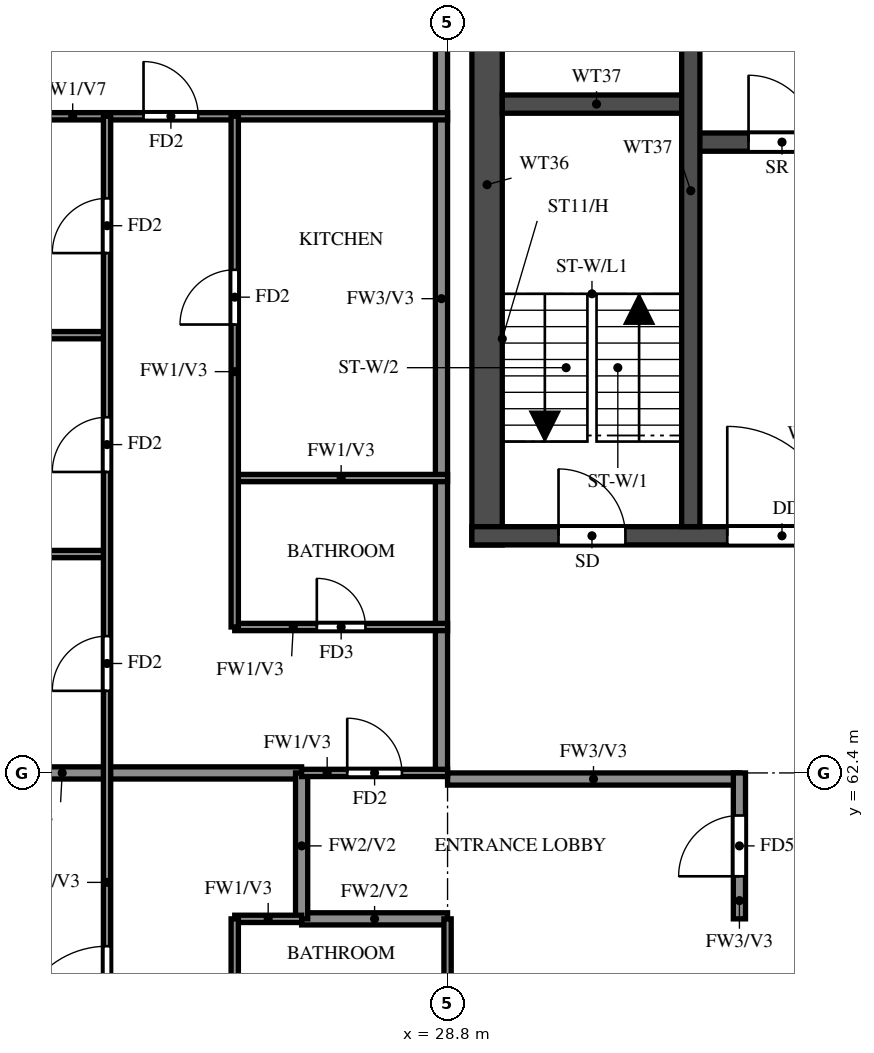
"""IFC4 building model, lengths in metres.
Left out: names, types, materials, properties, quantities, classifications, styles, units other than length and angle.
Written with IfcOpenShell. Run it as: python <this file> out.ifc"""

import sys

from ifc_helpers import new_model, si_unit, direction, frame, frame_2d, origin, place, context, subcontext, project, spatial, rectangle, extrude, element, fill, save


model = new_model("IFC4")
c1 = context("Model", 3, precision=1e-05, world=origin(), true_north=direction((0.0, 1.0)))
c2 = subcontext(c1, "Body", "Model", "MODEL_VIEW")
j1 = project(units=[si_unit("LENGTHUNIT", "METRE"), si_unit("PLANEANGLEUNIT", "RADIAN")], contexts=[c1])
p1 = place(None, origin())
s1 = spatial("IfcSite", under=j1, at=p1, CompositionType="ELEMENT")
p2 = place(p1, origin())
s2 = spatial("IfcBuilding", under=s1, at=p2, CompositionType="ELEMENT")
p3 = place(p2, frame((0.0, 0.0, 222.0)))
s3 = spatial("IfcBuildingStorey", under=s2, at=p3, CompositionType="ELEMENT", Elevation=222.0)
p4 = place(p3, frame((29.45, 66.15, 0.0), z_axis=(0.0, 0.0, 1.0), x_axis=(0.0, 1.0, 0.0)))
e1 = element("IfcWall", 1, at=p4, inside=s3, PredefinedType="SHEAR", context=c2, shape_type="SweptSolid", body=[
    extrude(rectangle(XDim=11.85, YDim=0.5, at=frame_2d((5.925, 0.0))), origin(), (0.0, 0.0, 1.0), 3.22),
])
p5 = place(p3, frame((29.2, 66.3, 0.0), z_axis=(0.0, 0.0, 1.0), x_axis=(1.0, 0.0, 0.0)))
e2 = element("IfcWall", 2, at=p5, inside=s3, PredefinedType="SHEAR", context=c2, shape_type="SweptSolid", body=[
    extrude(rectangle(XDim=42.4, YDim=0.3, at=frame_2d((21.2, 0.0))), origin(), (0.0, 0.0, 1.0), 3.22),
])
p6 = place(p5, frame((1.425, 0.0, 0.0)))
e3 = element("IfcOpeningElement", 3, at=p6, cuts=e2, PredefinedType="OPENING", context=c2, shape_type="SweptSolid", body=[
    extrude(rectangle(XDim=1.1, YDim=2.1, at=frame_2d((0.55, 1.05))), frame((0.0, 0.16, 0.0), z_axis=(0.0, -1.0, 0.0), x_axis=(1.0, 0.0, 0.0)), (0.0, 0.0, 1.0), 0.32),
])
p7 = place(p5, frame((4.2, 0.0, 0.0)))
e4 = element("IfcOpeningElement", 4, at=p7, cuts=e2, PredefinedType="OPENING", context=c2, shape_type="SweptSolid", body=[
    extrude(rectangle(XDim=1.8, YDim=2.1, at=frame_2d((0.9, 1.05))), frame((0.0, 0.16, 0.0), z_axis=(0.0, -1.0, 0.0), x_axis=(1.0, 0.0, 0.0)), (0.0, 0.0, 1.0), 0.32),
])
p8 = place(p3, frame((32.8, 72.775, 0.0), z_axis=(0.0, 0.0, 1.0), x_axis=(1.0, 0.0, 0.0)))
e5 = element("IfcWall", 5, at=p8, inside=s3, PredefinedType="SHEAR", context=c2, shape_type="SweptSolid", body=[
    extrude(rectangle(XDim=35.2, YDim=0.3, at=frame_2d((17.6, 0.0))), origin(), (0.0, 0.0, 1.0), 3.22),
])
p9 = place(p8, frame((19.8, 0.0, 0.0)))
e6 = element("IfcOpeningElement", 6, at=p9, cuts=e5, PredefinedType="OPENING", context=c2, shape_type="SweptSolid", body=[
    extrude(rectangle(XDim=1.1, YDim=2.1, at=frame_2d((0.55, 1.05))), frame((0.0, 0.16, 0.0), z_axis=(0.0, -1.0, 0.0), x_axis=(1.0, 0.0, 0.0)), (0.0, 0.0, 1.0), 0.32),
])
p10 = place(p8, frame((27.725, 0.0, 0.0)))
e7 = element("IfcOpeningElement", 7, at=p10, cuts=e5, PredefinedType="OPENING", context=c2, shape_type="SweptSolid", body=[
    extrude(rectangle(XDim=1.1, YDim=2.1, at=frame_2d((0.55, 1.05))), frame((0.0, 0.16, 0.0), z_axis=(0.0, -1.0, 0.0), x_axis=(1.0, 0.0, 0.0)), (0.0, 0.0, 1.0), 0.32),
])
p11 = place(p8, frame((30.325, 0.0, 0.0)))
e8 = element("IfcOpeningElement", 8, at=p11, cuts=e5, PredefinedType="OPENING", context=c2, shape_type="SweptSolid", body=[
    extrude(rectangle(XDim=1.1, YDim=2.1, at=frame_2d((0.55, 1.05))), frame((0.0, 0.16, 0.0), z_axis=(0.0, -1.0, 0.0), x_axis=(1.0, 0.0, 0.0)), (0.0, 0.0, 1.0), 0.32),
])
p12 = place(p8, frame((3.825, 0.0, 0.0)))
e9 = element("IfcOpeningElement", 9, at=p12, cuts=e5, PredefinedType="OPENING", context=c2, shape_type="SweptSolid", body=[
    extrude(rectangle(XDim=1.1, YDim=2.1, at=frame_2d((0.55, 1.05))), frame((0.0, 0.16, 0.0), z_axis=(0.0, -1.0, 0.0), x_axis=(1.0, 0.0, 0.0)), (0.0, 0.0, 1.0), 0.32),
])
p13 = place(p8, frame((6.575, 0.0, 0.0)))
e10 = element("IfcOpeningElement", 10, at=p13, cuts=e5, PredefinedType="OPENING", context=c2, shape_type="SweptSolid", body=[
    extrude(rectangle(XDim=1.1, YDim=2.1, at=frame_2d((0.55, 1.05))), frame((0.0, 0.16, 0.0), z_axis=(0.0, -1.0, 0.0), x_axis=(1.0, 0.0, 0.0)), (0.0, 0.0, 1.0), 0.32),
])
p14 = place(p8, frame((9.325, 0.0, 0.0)))
e11 = element("IfcOpeningElement", 11, at=p14, cuts=e5, PredefinedType="OPENING", context=c2, shape_type="SweptSolid", body=[
    extrude(rectangle(XDim=1.1, YDim=2.1, at=frame_2d((0.55, 1.05))), frame((0.0, 0.16, 0.0), z_axis=(0.0, -1.0, 0.0), x_axis=(1.0, 0.0, 0.0)), (0.0, 0.0, 1.0), 0.32),
])
p15 = place(p8, frame((12.075, 0.0, 0.0)))
e12 = element("IfcOpeningElement", 12, at=p15, cuts=e5, PredefinedType="OPENING", context=c2, shape_type="SweptSolid", body=[
    extrude(rectangle(XDim=1.1, YDim=2.1, at=frame_2d((0.55, 1.05))), frame((0.0, 0.16, 0.0), z_axis=(0.0, -1.0, 0.0), x_axis=(1.0, 0.0, 0.0)), (0.0, 0.0, 1.0), 0.32),
])
p16 = place(p8, frame((14.825, 0.0, 0.0)))
e13 = element("IfcOpeningElement", 13, at=p16, cuts=e5, PredefinedType="OPENING", context=c2, shape_type="SweptSolid", body=[
    extrude(rectangle(XDim=1.1, YDim=2.1, at=frame_2d((0.55, 1.05))), frame((0.0, 0.16, 0.0), z_axis=(0.0, -1.0, 0.0), x_axis=(1.0, 0.0, 0.0)), (0.0, 0.0, 1.0), 0.32),
])
p17 = place(p8, frame((17.575, 0.0, 0.0)))
e14 = element("IfcOpeningElement", 14, at=p17, cuts=e5, PredefinedType="OPENING", context=c2, shape_type="SweptSolid", body=[
    extrude(rectangle(XDim=1.1, YDim=2.1, at=frame_2d((0.55, 1.05))), frame((0.0, 0.16, 0.0), z_axis=(0.0, -1.0, 0.0), x_axis=(1.0, 0.0, 0.0)), (0.0, 0.0, 1.0), 0.32),
])
p18 = place(p8, frame((0.95, 0.0, 0.0)))
e15 = element("IfcOpeningElement", 15, at=p18, cuts=e5, PredefinedType="OPENING", context=c2, shape_type="SweptSolid", body=[
    extrude(rectangle(XDim=1.1, YDim=2.1, at=frame_2d((0.55, 1.05))), frame((0.0, 0.16, 0.0), z_axis=(0.0, -1.0, 0.0), x_axis=(1.0, 0.0, 0.0)), (0.0, 0.0, 1.0), 0.32),
])
p19 = place(p3, frame((29.7, 73.4, 0.0), z_axis=(0.0, 0.0, 1.0), x_axis=(1.0, 0.0, 0.0)))
e16 = element("IfcWall", 16, at=p19, inside=s3, PredefinedType="SHEAR", context=c2, shape_type="SweptSolid", body=[
    extrude(rectangle(XDim=3.1, YDim=0.3, at=frame_2d((1.55, 0.0))), origin(), (0.0, 0.0, 1.0), 3.22),
])
p20 = place(p3, frame((32.8, 66.45, 0.0), z_axis=(0.0, 0.0, 1.0), x_axis=(0.0, 1.0, 0.0)))
e17 = element("IfcWall", 17, at=p20, inside=s3, PredefinedType="SHEAR", context=c2, shape_type="SweptSolid", body=[
    extrude(rectangle(XDim=11.05, YDim=0.3, at=frame_2d((5.525, 0.0))), origin(), (0.0, 0.0, 1.0), 3.22),
])
p21 = place(p3, frame((28.8, 62.3, 0.0), z_axis=(0.0, 0.0, 1.0), x_axis=(1.0, 0.0, 0.0)))
e18 = element("IfcWall", 18, at=p21, inside=s3, PredefinedType="SOLIDWALL", context=c2, shape_type="SweptSolid", body=[
    extrude(rectangle(XDim=4.8, YDim=0.2, at=frame_2d((2.4, 0.0))), origin(), (0.0, 0.0, 1.0), 3.22),
])
p22 = place(p3, frame((28.7, 62.4, 0.0), z_axis=(0.0, 0.0, 1.0), x_axis=(0.0, 1.0, 0.0)))
e19 = element("IfcWall", 19, at=p22, inside=s3, PredefinedType="SOLIDWALL", context=c2, shape_type="SweptSolid", body=[
    extrude(rectangle(XDim=15.6, YDim=0.2, at=frame_2d((7.8, 0.0))), origin(), (0.0, 0.0, 1.0), 3.22),
])
p23 = place(p3, frame((33.6, 60.0, 0.0), z_axis=(0.0, 0.0, 1.0), x_axis=(0.0, 1.0, 0.0)))
e20 = element("IfcWall", 20, at=p23, inside=s3, PredefinedType="SOLIDWALL", context=c2, shape_type="SweptSolid", body=[
    extrude(rectangle(XDim=2.4, YDim=0.2, at=frame_2d((1.2, 0.0))), origin(), (0.0, 0.0, 1.0), 3.22),
])
p24 = place(p23, frame((0.7, 0.0, 0.0)))
e21 = element("IfcOpeningElement", 21, at=p24, cuts=e20, PredefinedType="OPENING", context=c2, shape_type="SweptSolid", body=[
    extrude(rectangle(XDim=1.0, YDim=2.1, at=frame_2d((0.5, 1.05))), frame((0.0, 0.11, 0.0), z_axis=(0.0, -1.0, 0.0), x_axis=(1.0, 0.0, 0.0)), (0.0, 0.0, 1.0), 0.22),
])
p25 = place(p3, frame((26.4, 60.0, 0.0), z_axis=(0.0, 0.0, 1.0), x_axis=(1.0, 0.0, 0.0)))
e22 = element("IfcWall", 22, at=p25, inside=s3, PredefinedType="SOLIDWALL", context=c2, shape_type="SweptSolid", body=[
    extrude(rectangle(XDim=2.4, YDim=0.2, at=frame_2d((1.2, 0.0))), origin(), (0.0, 0.0, 1.0), 3.22),
])
p26 = place(p3, frame((18.525, 62.4, 0.0), z_axis=(0.0, 0.0, 1.0), x_axis=(1.0, 0.0, 0.0)))
e23 = element("IfcWall", 23, at=p26, inside=s3, PredefinedType="SOLIDWALL", context=c2, shape_type="SweptSolid", body=[
    extrude(rectangle(XDim=7.875, YDim=0.2, at=frame_2d((3.938, 0.0))), origin(), (0.0, 0.0, 1.0), 3.22),
])
p27 = place(p3, frame((26.4, 60.0, 0.0), z_axis=(0.0, 0.0, 1.0), x_axis=(0.0, 1.0, 0.0)))
e24 = element("IfcWall", 24, at=p27, inside=s3, PredefinedType="SOLIDWALL", context=c2, shape_type="SweptSolid", body=[
    extrude(rectangle(XDim=2.4, YDim=0.2, at=frame_2d((1.2, 0.0))), origin(), (0.0, 0.0, 1.0), 3.22),
])
p28 = place(p3, frame((25.3, 60.0, 0.0), z_axis=(0.0, 0.0, 1.0), x_axis=(1.0, 0.0, 0.0)))
e25 = element("IfcWall", 25, at=p28, inside=s3, PredefinedType="PARTITIONING", context=c2, shape_type="SweptSolid", body=[
    extrude(rectangle(XDim=1.1, YDim=0.12, at=frame_2d((0.55, 0.0))), origin(), (0.0, 0.0, 1.0), 3.22),
])
p29 = place(p3, frame((26.4, 62.4, 0.0), z_axis=(0.0, 0.0, 1.0), x_axis=(1.0, 0.0, 0.0)))
e26 = element("IfcWall", 26, at=p29, inside=s3, PredefinedType="PARTITIONING", context=c2, shape_type="SweptSolid", body=[
    extrude(rectangle(XDim=2.4, YDim=0.12, at=frame_2d((1.2, 0.0))), origin(), (0.0, 0.0, 1.0), 3.22),
])
p30 = place(p29, frame((0.75, 0.0, 0.0)))
e27 = element("IfcOpeningElement", 27, at=p30, cuts=e26, PredefinedType="OPENING", context=c2, shape_type="SweptSolid", body=[
    extrude(rectangle(XDim=0.9, YDim=2.1, at=frame_2d((0.45, 1.05))), frame((0.0, 0.07, 0.0), z_axis=(0.0, -1.0, 0.0), x_axis=(1.0, 0.0, 0.0)), (0.0, 0.0, 1.0), 0.14),
])
p31 = place(p3, frame((25.3, 64.8, 0.0), z_axis=(0.0, 0.0, 1.0), x_axis=(1.0, 0.0, 0.0)))
e28 = element("IfcWall", 28, at=p31, inside=s3, PredefinedType="PARTITIONING", context=c2, shape_type="SweptSolid", body=[
    extrude(rectangle(XDim=3.5, YDim=0.12, at=frame_2d((1.75, 0.0))), origin(), (0.0, 0.0, 1.0), 3.22),
])
p32 = place(p31, frame((1.35, 0.0, 0.0)))
e29 = element("IfcOpeningElement", 29, at=p32, cuts=e28, PredefinedType="OPENING", context=c2, shape_type="SweptSolid", body=[
    extrude(rectangle(XDim=0.8, YDim=2.1, at=frame_2d((0.4, 1.05))), frame((0.0, 0.07, 0.0), z_axis=(0.0, -1.0, 0.0), x_axis=(1.0, 0.0, 0.0)), (0.0, 0.0, 1.0), 0.14),
])
p33 = place(p3, frame((18.525, 66.0, 0.0), z_axis=(0.0, 0.0, 1.0), x_axis=(1.0, 0.0, 0.0)))
e30 = element("IfcWall", 30, at=p33, inside=s3, PredefinedType="PARTITIONING", context=c2, shape_type="SweptSolid", body=[
    extrude(rectangle(XDim=4.675, YDim=0.12, at=frame_2d((2.337, 0.0))), origin(), (0.0, 0.0, 1.0), 2.32),
])
p34 = place(p3, frame((25.3, 67.25, 0.0), z_axis=(0.0, 0.0, 1.0), x_axis=(1.0, 0.0, 0.0)))
e31 = element("IfcWall", 31, at=p34, inside=s3, PredefinedType="PARTITIONING", context=c2, shape_type="SweptSolid", body=[
    extrude(rectangle(XDim=3.5, YDim=0.12, at=frame_2d((1.75, 0.0))), origin(), (0.0, 0.0, 1.0), 3.22),
])
p35 = place(p3, frame((18.525, 69.6, 0.0), z_axis=(0.0, 0.0, 1.0), x_axis=(1.0, 0.0, 0.0)))
e32 = element("IfcWall", 32, at=p35, inside=s3, PredefinedType="PARTITIONING", context=c2, shape_type="SweptSolid", body=[
    extrude(rectangle(XDim=4.675, YDim=0.12, at=frame_2d((2.337, 0.0))), origin(), (0.0, 0.0, 1.0), 3.22),
])
p36 = place(p3, frame((18.525, 73.2, 0.0), z_axis=(0.0, 0.0, 1.0), x_axis=(1.0, 0.0, 0.0)))
e33 = element("IfcWall", 33, at=p36, inside=s3, PredefinedType="PARTITIONING", context=c2, shape_type="SweptSolid", body=[
    extrude(rectangle(XDim=10.275, YDim=0.12, at=frame_2d((5.138, 0.0))), origin(), (0.0, 0.0, 1.0), 2.32),
])
p37 = place(p36, frame((5.275, 0.0, 0.0)))
e34 = element("IfcOpeningElement", 34, at=p37, cuts=e33, PredefinedType="OPENING", context=c2, shape_type="SweptSolid", body=[
    extrude(rectangle(XDim=0.9, YDim=2.1, at=frame_2d((0.45, 1.05))), frame((0.0, 0.07, 0.0), z_axis=(0.0, -1.0, 0.0), x_axis=(1.0, 0.0, 0.0)), (0.0, 0.0, 1.0), 0.14),
])
p38 = place(p3, frame((23.2, 48.0, 0.0), z_axis=(0.0, 0.0, 1.0), x_axis=(0.0, 1.0, 0.0)))
e35 = element("IfcWall", 35, at=p38, inside=s3, PredefinedType="PARTITIONING", context=c2, shape_type="SweptSolid", body=[
    extrude(rectangle(XDim=25.2, YDim=0.12, at=frame_2d((12.6, 0.0))), origin(), (0.0, 0.0, 1.0), 3.22),
])
p39 = place(p38, frame((1.35, 0.0, 0.0)))
e36 = element("IfcOpeningElement", 36, at=p39, cuts=e35, PredefinedType="OPENING", context=c2, shape_type="SweptSolid", body=[
    extrude(rectangle(XDim=0.9, YDim=2.1, at=frame_2d((0.45, 1.05))), frame((0.0, 0.07, 0.0), z_axis=(0.0, -1.0, 0.0), x_axis=(1.0, 0.0, 0.0)), (0.0, 0.0, 1.0), 0.14),
])
p40 = place(p38, frame((4.95, 0.0, 0.0)))
e37 = element("IfcOpeningElement", 37, at=p40, cuts=e35, PredefinedType="OPENING", context=c2, shape_type="SweptSolid", body=[
    extrude(rectangle(XDim=0.9, YDim=2.1, at=frame_2d((0.45, 1.05))), frame((0.0, 0.07, 0.0), z_axis=(0.0, -1.0, 0.0), x_axis=(1.0, 0.0, 0.0)), (0.0, 0.0, 1.0), 0.14),
])
p41 = place(p38, frame((10.05, 0.0, 0.0)))
e38 = element("IfcOpeningElement", 38, at=p41, cuts=e35, PredefinedType="OPENING", context=c2, shape_type="SweptSolid", body=[
    extrude(rectangle(XDim=1.5, YDim=2.1, at=frame_2d((0.75, 1.05))), frame((0.0, 0.07, 0.0), z_axis=(0.0, -1.0, 0.0), x_axis=(1.0, 0.0, 0.0)), (0.0, 0.0, 1.0), 0.14),
])
p42 = place(p38, frame((15.75, 0.0, 0.0)))
e39 = element("IfcOpeningElement", 39, at=p42, cuts=e35, PredefinedType="OPENING", context=c2, shape_type="SweptSolid", body=[
    extrude(rectangle(XDim=0.9, YDim=2.1, at=frame_2d((0.45, 1.05))), frame((0.0, 0.07, 0.0), z_axis=(0.0, -1.0, 0.0), x_axis=(1.0, 0.0, 0.0)), (0.0, 0.0, 1.0), 0.14),
])
p43 = place(p38, frame((19.35, 0.0, 0.0)))
e40 = element("IfcOpeningElement", 40, at=p43, cuts=e35, PredefinedType="OPENING", context=c2, shape_type="SweptSolid", body=[
    extrude(rectangle(XDim=0.9, YDim=2.1, at=frame_2d((0.45, 1.05))), frame((0.0, 0.07, 0.0), z_axis=(0.0, -1.0, 0.0), x_axis=(1.0, 0.0, 0.0)), (0.0, 0.0, 1.0), 0.14),
])
p44 = place(p38, frame((22.95, 0.0, 0.0)))
e41 = element("IfcOpeningElement", 41, at=p44, cuts=e35, PredefinedType="OPENING", context=c2, shape_type="SweptSolid", body=[
    extrude(rectangle(XDim=0.9, YDim=2.1, at=frame_2d((0.45, 1.05))), frame((0.0, 0.07, 0.0), z_axis=(0.0, -1.0, 0.0), x_axis=(1.0, 0.0, 0.0)), (0.0, 0.0, 1.0), 0.14),
])
p45 = place(p3, frame((25.3, 57.6, 0.0), z_axis=(0.0, 0.0, 1.0), x_axis=(0.0, 1.0, 0.0)))
e42 = element("IfcWall", 42, at=p45, inside=s3, PredefinedType="PARTITIONING", context=c2, shape_type="SweptSolid", body=[
    extrude(rectangle(XDim=2.4, YDim=0.12, at=frame_2d((1.2, 0.0))), origin(), (0.0, 0.0, 1.0), 3.22),
])
p46 = place(p3, frame((25.3, 64.8, 0.0), z_axis=(0.0, 0.0, 1.0), x_axis=(0.0, 1.0, 0.0)))
e43 = element("IfcWall", 43, at=p46, inside=s3, PredefinedType="PARTITIONING", context=c2, shape_type="SweptSolid", body=[
    extrude(rectangle(XDim=8.4, YDim=0.12, at=frame_2d((4.2, 0.0))), origin(), (0.0, 0.0, 1.0), 3.22),
])
p47 = place(p46, frame((4.975, 0.0, 0.0)))
e44 = element("IfcOpeningElement", 44, at=p47, cuts=e43, PredefinedType="OPENING", context=c2, shape_type="SweptSolid", body=[
    extrude(rectangle(XDim=0.9, YDim=2.1, at=frame_2d((0.45, 1.05))), frame((0.0, 0.07, 0.0), z_axis=(0.0, -1.0, 0.0), x_axis=(1.0, 0.0, 0.0)), (0.0, 0.0, 1.0), 0.14),
])
p48 = place(p3, frame((28.8, 57.6, 0.0), z_axis=(0.0, 0.0, 1.0), x_axis=(0.0, 1.0, 0.0)))
e45 = element("IfcWall", 45, at=p48, inside=s3, PredefinedType="PARTITIONING", context=c2, shape_type="SweptSolid", body=[
    extrude(rectangle(XDim=2.4, YDim=0.12, at=frame_2d((1.2, 0.0))), origin(), (0.0, 0.0, 1.0), 3.22),
])
p49 = place(p6, origin())
e46 = element("IfcDoor", 46, at=p49, inside=s3, OperationType="SINGLE_SWING_LEFT", PredefinedType="DOOR", context=c2, shape_type="SweptSolid", body=[
    extrude(rectangle(XDim=1.1, YDim=2.1, at=frame_2d((0.55, 1.05))), frame((0.0, 0.025, 0.0), z_axis=(0.0, -1.0, 0.0), x_axis=(1.0, 0.0, 0.0)), (0.0, 0.0, 1.0), 0.05),
])
fill(e3, e46)
p50 = place(p7, origin())
e47 = element("IfcDoor", 47, at=p50, inside=s3, OperationType="DOUBLE_DOOR_SINGLE_SWING", PredefinedType="DOOR", context=c2, shape_type="SweptSolid", body=[
    extrude(rectangle(XDim=1.8, YDim=2.1, at=frame_2d((0.9, 1.05))), frame((0.0, 0.025, 0.0), z_axis=(0.0, -1.0, 0.0), x_axis=(1.0, 0.0, 0.0)), (0.0, 0.0, 1.0), 0.05),
])
fill(e4, e47)
p51 = place(p18, origin())
e48 = element("IfcDoor", 48, at=p51, inside=s3, OperationType="SINGLE_SWING_LEFT", PredefinedType="DOOR", context=c2, shape_type="SweptSolid", body=[
    extrude(rectangle(XDim=1.1, YDim=2.1, at=frame_2d((0.55, 1.05))), frame((0.0, 0.025, 0.0), z_axis=(0.0, -1.0, 0.0), x_axis=(1.0, 0.0, 0.0)), (0.0, 0.0, 1.0), 0.05),
])
fill(e15, e48)
p52 = place(p41, origin())
e49 = element("IfcDoor", 49, at=p52, inside=s3, OperationType="SINGLE_SWING_RIGHT", PredefinedType="DOOR", context=c2, shape_type="SweptSolid", body=[
    extrude(rectangle(XDim=1.5, YDim=2.1, at=frame_2d((0.75, 1.05))), frame((0.0, 0.025, 0.0), z_axis=(0.0, -1.0, 0.0), x_axis=(1.0, 0.0, 0.0)), (0.0, 0.0, 1.0), 0.05),
])
fill(e38, e49)
p53 = place(p30, origin())
e50 = element("IfcDoor", 50, at=p53, inside=s3, OperationType="SINGLE_SWING_LEFT", PredefinedType="DOOR", context=c2, shape_type="SweptSolid", body=[
    extrude(rectangle(XDim=0.9, YDim=2.1, at=frame_2d((0.45, 1.05))), frame((0.0, 0.025, 0.0), z_axis=(0.0, -1.0, 0.0), x_axis=(1.0, 0.0, 0.0)), (0.0, 0.0, 1.0), 0.05),
])
fill(e27, e50)
p54 = place(p24, origin())
e51 = element("IfcDoor", 51, at=p54, inside=s3, OperationType="SINGLE_SWING_LEFT", PredefinedType="DOOR", context=c2, shape_type="SweptSolid", body=[
    extrude(rectangle(XDim=1.0, YDim=2.1, at=frame_2d((0.5, 1.05))), frame((0.0, 0.025, 0.0), z_axis=(0.0, -1.0, 0.0), x_axis=(1.0, 0.0, 0.0)), (0.0, 0.0, 1.0), 0.05),
])
fill(e21, e51)
p55 = place(p42, origin())
e52 = element("IfcDoor", 52, at=p55, inside=s3, OperationType="SINGLE_SWING_RIGHT", PredefinedType="DOOR", context=c2, shape_type="SweptSolid", body=[
    extrude(rectangle(XDim=0.9, YDim=2.1, at=frame_2d((0.45, 1.05))), frame((0.0, 0.025, 0.0), z_axis=(0.0, -1.0, 0.0), x_axis=(1.0, 0.0, 0.0)), (0.0, 0.0, 1.0), 0.05),
])
fill(e39, e52)
p56 = place(p43, origin())
e53 = element("IfcDoor", 53, at=p56, inside=s3, OperationType="SINGLE_SWING_LEFT", PredefinedType="DOOR", context=c2, shape_type="SweptSolid", body=[
    extrude(rectangle(XDim=0.9, YDim=2.1, at=frame_2d((0.45, 1.05))), frame((0.0, 0.025, 0.0), z_axis=(0.0, -1.0, 0.0), x_axis=(1.0, 0.0, 0.0)), (0.0, 0.0, 1.0), 0.05),
])
fill(e40, e53)
p57 = place(p44, origin())
e54 = element("IfcDoor", 54, at=p57, inside=s3, OperationType="SINGLE_SWING_LEFT", PredefinedType="DOOR", context=c2, shape_type="SweptSolid", body=[
    extrude(rectangle(XDim=0.9, YDim=2.1, at=frame_2d((0.45, 1.05))), frame((0.0, 0.025, 0.0), z_axis=(0.0, -1.0, 0.0), x_axis=(1.0, 0.0, 0.0)), (0.0, 0.0, 1.0), 0.05),
])
fill(e41, e54)
p58 = place(p37, origin())
e55 = element("IfcDoor", 55, at=p58, inside=s3, OperationType="SINGLE_SWING_RIGHT", PredefinedType="DOOR", context=c2, shape_type="SweptSolid", body=[
    extrude(rectangle(XDim=0.9, YDim=2.1, at=frame_2d((0.45, 1.05))), frame((0.0, 0.025, 0.0), z_axis=(0.0, -1.0, 0.0), x_axis=(1.0, 0.0, 0.0)), (0.0, 0.0, 1.0), 0.05),
])
fill(e34, e55)
p59 = place(p32, origin())
e56 = element("IfcDoor", 56, at=p59, inside=s3, OperationType="SINGLE_SWING_LEFT", PredefinedType="DOOR", context=c2, shape_type="SweptSolid", body=[
    extrude(rectangle(XDim=0.8, YDim=2.1, at=frame_2d((0.4, 1.05))), frame((0.0, 0.025, 0.0), z_axis=(0.0, -1.0, 0.0), x_axis=(1.0, 0.0, 0.0)), (0.0, 0.0, 1.0), 0.05),
])
fill(e29, e56)
p60 = place(p47, origin())
e57 = element("IfcDoor", 57, at=p60, inside=s3, OperationType="SINGLE_SWING_LEFT", PredefinedType="DOOR", context=c2, shape_type="SweptSolid", body=[
    extrude(rectangle(XDim=0.9, YDim=2.1, at=frame_2d((0.45, 1.05))), frame((0.0, 0.025, 0.0), z_axis=(0.0, -1.0, 0.0), x_axis=(1.0, 0.0, 0.0)), (0.0, 0.0, 1.0), 0.05),
])
fill(e44, e57)
save(model, sys.argv[1])
